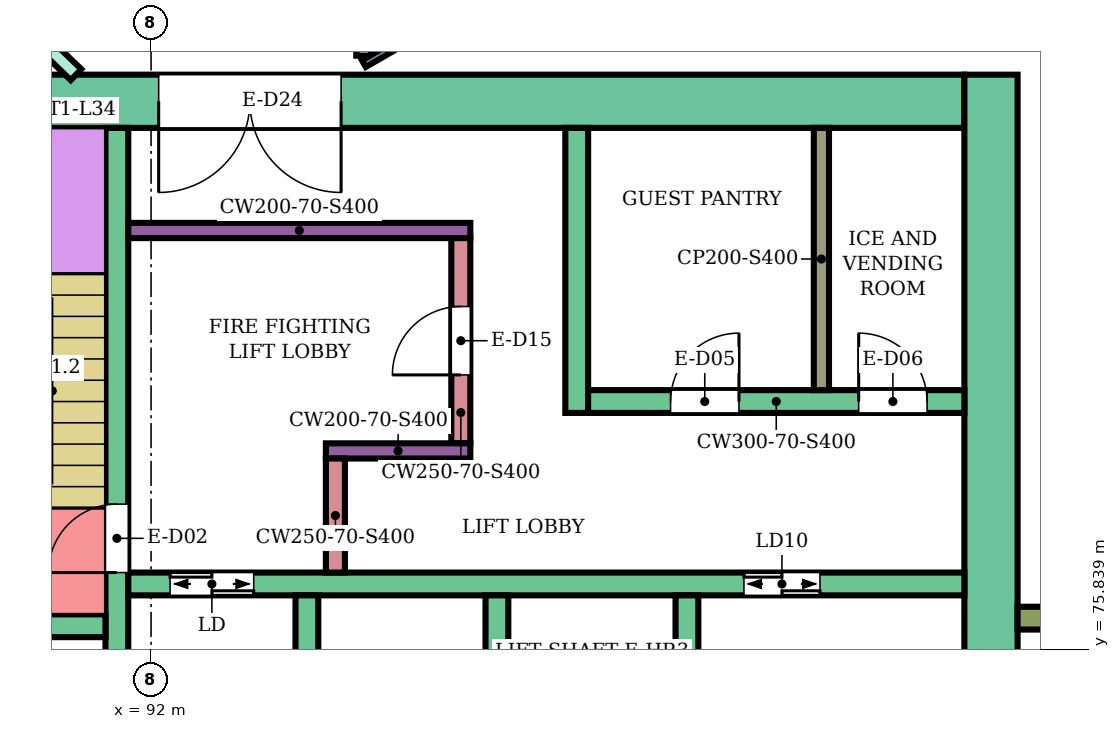
"""IFC4 building model, lengths in metres.
Left out: names, types, materials, properties, quantities, classifications, styles, units other than length and angle.
Written with IfcOpenShell. Run it as: python <this file> out.ifc"""

import sys

from ifc_helpers import new_model, si_unit, direction, frame, frame_2d, origin, place, context, subcontext, project, spatial, rectangle, extrude, element, fill, save


model = new_model("IFC4")
c1 = context("Model", 3, precision=1e-05, world=origin(), true_north=direction((0.0, 1.0)))
c2 = subcontext(c1, "Body", "Model", "MODEL_VIEW")
j1 = project(units=[si_unit("LENGTHUNIT", "METRE"), si_unit("PLANEANGLEUNIT", "RADIAN")], contexts=[c1])
p1 = place(None, origin())
s1 = spatial("IfcSite", under=j1, at=p1, CompositionType="ELEMENT")
p2 = place(p1, origin())
s2 = spatial("IfcBuilding", under=s1, at=p2, CompositionType="ELEMENT")
p3 = place(p2, frame((0.0, 0.0, 145.8)))
s3 = spatial("IfcBuildingStorey", under=s2, at=p3, CompositionType="ELEMENT", Elevation=145.8)
p4 = place(p3, frame((87.9, 83.05, 0.0), z_axis=(0.0, 0.0, 1.0), x_axis=(1.0, 0.0, 0.0)))
e1 = element("IfcWall", 1, at=p4, inside=s3, PredefinedType="SHEAR", context=c2, shape_type="SweptSolid", body=[
    extrude(rectangle(XDim=14.8, YDim=0.7, at=frame_2d((7.4, 0.0))), origin(), (0.0, 0.0, 1.0), 3.5),
])
p5 = place(p4, frame((4.2, 0.0, 0.0)))
e2 = element("IfcOpeningElement", 2, at=p5, cuts=e1, PredefinedType="OPENING", context=c2, shape_type="SweptSolid", body=[
    extrude(rectangle(XDim=2.4, YDim=2.4, at=frame_2d((1.2, 1.2))), frame((0.0, 0.36, 0.0), z_axis=(0.0, -1.0, 0.0), x_axis=(1.0, 0.0, 0.0)), (0.0, 0.0, 1.0), 0.72),
])
p6 = place(p3, frame((103.05, 66.6, 0.0), z_axis=(0.0, 0.0, 1.0), x_axis=(0.0, 1.0, 0.0)))
e3 = element("IfcWall", 3, at=p6, inside=s3, PredefinedType="SHEAR", context=c2, shape_type="SweptSolid", body=[
    extrude(rectangle(XDim=16.8, YDim=0.7, at=frame_2d((8.4, 0.0))), origin(), (0.0, 0.0, 1.0), 3.5),
])
p7 = place(p3, frame((91.55, 75.0, 0.0), z_axis=(0.0, 0.0, 1.0), x_axis=(0.0, 1.0, 0.0)))
e4 = element("IfcWall", 4, at=p7, inside=s3, PredefinedType="SHEAR", context=c2, shape_type="SweptSolid", body=[
    extrude(rectangle(XDim=7.7, YDim=0.3, at=frame_2d((3.85, 0.0))), origin(), (0.0, 0.0, 1.0), 3.5),
])
p8 = place(p7, frame((1.85, 0.0, 0.0)))
e5 = element("IfcOpeningElement", 5, at=p8, cuts=e4, PredefinedType="OPENING", context=c2, shape_type="SweptSolid", body=[
    extrude(rectangle(XDim=0.9, YDim=2.1, at=frame_2d((0.45, 1.05))), frame((0.0, 0.16, 0.0), z_axis=(0.0, -1.0, 0.0), x_axis=(1.0, 0.0, 0.0)), (0.0, 0.0, 1.0), 0.32),
])
p9 = place(p3, frame((88.35, 76.15, 0.0), z_axis=(0.0, 0.0, 1.0), x_axis=(1.0, 0.0, 0.0)))
e6 = element("IfcWall", 6, at=p9, inside=s3, PredefinedType="SHEAR", context=c2, shape_type="SweptSolid", body=[
    extrude(rectangle(XDim=3.05, YDim=0.3, at=frame_2d((1.525, 0.0))), origin(), (0.0, 0.0, 1.0), 3.5),
])
p10 = place(p9, frame((1.1, 0.0, 0.0)))
e7 = element("IfcOpeningElement", 7, at=p10, cuts=e6, PredefinedType="OPENING", context=c2, shape_type="SweptSolid", body=[
    extrude(rectangle(XDim=0.7, YDim=2.0, at=frame_2d((0.35, 1.0))), frame((0.0, 0.16, 0.0), z_axis=(0.0, -1.0, 0.0), x_axis=(1.0, 0.0, 0.0)), (0.0, 0.0, 1.0), 0.32),
])
p11 = place(p3, frame((91.7, 76.7, 0.0), z_axis=(0.0, 0.0, 1.0), x_axis=(1.0, 0.0, 0.0)))
e8 = element("IfcWall", 8, at=p11, inside=s3, PredefinedType="SHEAR", context=c2, shape_type="SweptSolid", body=[
    extrude(rectangle(XDim=11.0, YDim=0.3, at=frame_2d((5.5, 0.0))), origin(), (0.0, 0.0, 1.0), 3.5),
])
p12 = place(p11, frame((0.55, 0.0, 0.0)))
e9 = element("IfcOpeningElement", 9, at=p12, cuts=e8, PredefinedType="OPENING", context=c2, shape_type="SweptSolid", body=[
    extrude(rectangle(XDim=1.1, YDim=2.1, at=frame_2d((0.55, 1.05))), frame((0.0, 0.16, 0.0), z_axis=(0.0, -1.0, 0.0), x_axis=(1.0, 0.0, 0.0)), (0.0, 0.0, 1.0), 0.32),
])
p13 = place(p11, frame((8.1, 0.0, 0.0)))
e10 = element("IfcOpeningElement", 10, at=p13, cuts=e8, PredefinedType="OPENING", context=c2, shape_type="SweptSolid", body=[
    extrude(rectangle(XDim=1.0, YDim=2.1, at=frame_2d((0.5, 1.05))), frame((0.0, 0.16, 0.0), z_axis=(0.0, -1.0, 0.0), x_axis=(1.0, 0.0, 0.0)), (0.0, 0.0, 1.0), 0.32),
])
for number, where, z_axis, x_axis in (
    (11, (94.05, 74.0, 0.0), (0.0, 0.0, 1.0), (0.0, 1.0, 0.0)),
    (12, (96.55, 74.0, 0.0), (0.0, 0.0, 1.0), (0.0, 1.0, 0.0)),
    (13, (99.05, 74.0, 0.0), (0.0, 0.0, 1.0), (0.0, 1.0, 0.0)),
):
    element("IfcWall", number, at=place(p3, frame(where, z_axis=z_axis, x_axis=x_axis)), inside=s3, PredefinedType="SHEAR", context=c2, shape_type="SweptSolid", body=[
        extrude(rectangle(XDim=2.55, YDim=0.3, at=frame_2d((1.275, 0.0))), origin(), (0.0, 0.0, 1.0), 3.5),
    ])
p14 = place(p3, frame((91.7, 81.35, 0.0), z_axis=(0.0, 0.0, 1.0), x_axis=(1.0, 0.0, 0.0)))
e14 = element("IfcWall", 14, at=p14, inside=s3, PredefinedType="SHEAR", context=c2, shape_type="SweptSolid", body=[
    extrude(rectangle(XDim=4.5, YDim=0.2, at=frame_2d((2.25, 0.0))), origin(), (0.0, 0.0, 1.0), 3.5),
])
p15 = place(p3, frame((96.075, 78.55, 0.0), z_axis=(0.0, 0.0, 1.0), x_axis=(0.0, 1.0, 0.0)))
e15 = element("IfcWall", 15, at=p15, inside=s3, PredefinedType="SHEAR", context=c2, shape_type="SweptSolid", body=[
    extrude(rectangle(XDim=2.7, YDim=0.25, at=frame_2d((1.35, 0.0))), origin(), (0.0, 0.0, 1.0), 3.5),
])
p16 = place(p15, frame((0.9, 0.0, 0.0)))
e16 = element("IfcOpeningElement", 16, at=p16, cuts=e15, PredefinedType="OPENING", context=c2, shape_type="SweptSolid", body=[
    extrude(rectangle(XDim=0.9, YDim=2.1, at=frame_2d((0.45, 1.05))), frame((0.0, 0.135, 0.0), z_axis=(0.0, -1.0, 0.0), x_axis=(1.0, 0.0, 0.0)), (0.0, 0.0, 1.0), 0.27),
])
p17 = place(p3, frame((94.3, 78.45, 0.0), z_axis=(0.0, 0.0, 1.0), x_axis=(1.0, 0.0, 0.0)))
e17 = element("IfcWall", 17, at=p17, inside=s3, PredefinedType="SHEAR", context=c2, shape_type="SweptSolid", body=[
    extrude(rectangle(XDim=1.9, YDim=0.2, at=frame_2d((0.95, 0.0))), origin(), (0.0, 0.0, 1.0), 3.5),
])
p18 = place(p3, frame((94.425, 76.85, 0.0), z_axis=(0.0, 0.0, 1.0), x_axis=(0.0, 1.0, 0.0)))
e18 = element("IfcWall", 18, at=p18, inside=s3, PredefinedType="SHEAR", context=c2, shape_type="SweptSolid", body=[
    extrude(rectangle(XDim=1.5, YDim=0.25, at=frame_2d((0.75, 0.0))), origin(), (0.0, 0.0, 1.0), 3.5),
])
p19 = place(p3, frame((97.6, 78.95, 0.0), z_axis=(0.0, 0.0, 1.0), x_axis=(0.0, 1.0, 0.0)))
e19 = element("IfcWall", 19, at=p19, inside=s3, PredefinedType="SHEAR", context=c2, shape_type="SweptSolid", body=[
    extrude(rectangle(XDim=3.75, YDim=0.3, at=frame_2d((1.875, 0.0))), origin(), (0.0, 0.0, 1.0), 3.5),
])
p20 = place(p3, frame((97.75, 79.1, 0.0), z_axis=(0.0, 0.0, 1.0), x_axis=(1.0, 0.0, 0.0)))
e20 = element("IfcWall", 20, at=p20, inside=s3, PredefinedType="SHEAR", context=c2, shape_type="SweptSolid", body=[
    extrude(rectangle(XDim=4.95, YDim=0.3, at=frame_2d((2.475, 0.0))), origin(), (0.0, 0.0, 1.0), 3.5),
])
p21 = place(p20, frame((1.084, 0.0, 0.0)))
e21 = element("IfcOpeningElement", 21, at=p21, cuts=e20, PredefinedType="OPENING", context=c2, shape_type="SweptSolid", body=[
    extrude(rectangle(XDim=0.9, YDim=2.1, at=frame_2d((0.45, 1.05))), frame((0.0, 0.16, 0.0), z_axis=(0.0, -1.0, 0.0), x_axis=(1.0, 0.0, 0.0)), (0.0, 0.0, 1.0), 0.32),
])
p22 = place(p20, frame((3.56, 0.0, 0.0)))
e22 = element("IfcOpeningElement", 22, at=p22, cuts=e20, PredefinedType="OPENING", context=c2, shape_type="SweptSolid", body=[
    extrude(rectangle(XDim=0.9, YDim=2.1, at=frame_2d((0.45, 1.05))), frame((0.0, 0.16, 0.0), z_axis=(0.0, -1.0, 0.0), x_axis=(1.0, 0.0, 0.0)), (0.0, 0.0, 1.0), 0.32),
])
p23 = place(p3, frame((103.4, 76.25, 0.0), z_axis=(0.0, 0.0, 1.0), x_axis=(1.0, 0.0, 0.0)))
e23 = element("IfcWall", 23, at=p23, inside=s3, PredefinedType="NOTDEFINED", context=c2, shape_type="SweptSolid", body=[
    extrude(rectangle(XDim=2.416, YDim=0.3, at=frame_2d((1.208, 0.0))), origin(), (0.0, 0.0, 1.0), 3.9),
])
p24 = place(p3, frame((87.064, 87.211, 0.0), z_axis=(0.0, 0.0, 1.0), x_axis=(0.719562412484, -0.694427774891, 0.0)))
e24 = element("IfcWall", 24, at=p24, inside=s3, PredefinedType="PARTITIONING", context=c2, shape_type="SweptSolid", body=[
    extrude(rectangle(XDim=5.488, YDim=0.2, at=frame_2d((2.744, 0.0))), origin(), (0.0, 0.0, 1.0), 3.45),
])
p25 = place(p24, frame((2.294, 0.0, 0.0)))
e25 = element("IfcOpeningElement", 25, at=p25, cuts=e24, PredefinedType="OPENING", context=c2, shape_type="SweptSolid", body=[
    extrude(rectangle(XDim=0.9, YDim=2.1, at=frame_2d((0.45, 1.05))), frame((0.0, 0.11, 0.0), z_axis=(0.0, -1.0, 0.0), x_axis=(1.0, 0.0, 0.0)), (0.0, 0.0, 1.0), 0.22),
])
p26 = place(p3, frame((94.8, 83.65, 0.0), z_axis=(0.0, 0.0, 1.0), x_axis=(0.0, 1.0, 0.0)))
e26 = element("IfcWall", 26, at=p26, inside=s3, PredefinedType="PARTITIONING", context=c2, shape_type="SweptSolid", body=[
    extrude(rectangle(XDim=1.25, YDim=0.2, at=frame_2d((0.625, 0.0))), origin(), (0.0, 0.0, 1.0), 3.45),
])
p27 = place(p3, frame((94.8, 83.545, 0.0), z_axis=(0.0, 0.0, 1.0), x_axis=(0.86602264145, 0.500004784474, 0.0)))
e27 = element("IfcWall", 27, at=p27, inside=s3, PredefinedType="PARTITIONING", context=c2, shape_type="SweptSolid", body=[
    extrude(rectangle(XDim=8.708, YDim=0.1, at=frame_2d((4.354, 0.0))), origin(), (0.0, 0.0, 1.0), 3.45),
])
p28 = place(p27, frame((3.879, 0.0, 0.0)))
e28 = element("IfcOpeningElement", 28, at=p28, cuts=e27, PredefinedType="OPENING", context=c2, shape_type="SweptSolid", body=[
    extrude(rectangle(XDim=0.9, YDim=2.1, at=frame_2d((0.45, 1.05))), frame((0.0, 0.06, 0.0), z_axis=(0.0, -1.0, 0.0), x_axis=(1.0, 0.0, 0.0)), (0.0, 0.0, 1.0), 0.12),
])
p29 = place(p3, frame((100.819, 79.25, 0.0), z_axis=(0.0, 0.0, 1.0), x_axis=(0.0, 1.0, 0.0)))
e29 = element("IfcWall", 29, at=p29, inside=s3, PredefinedType="PARTITIONING", context=c2, shape_type="SweptSolid", body=[
    extrude(rectangle(XDim=3.45, YDim=0.2, at=frame_2d((1.725, 0.0))), origin(), (0.0, 0.0, 1.0), 3.5),
])
p30 = place(p8, origin())
e30 = element("IfcDoor", 30, at=p30, inside=s3, OperationType="SINGLE_SWING_LEFT", PredefinedType="DOOR", context=c2, shape_type="SweptSolid", body=[
    extrude(rectangle(XDim=0.9, YDim=2.1, at=frame_2d((0.45, 1.05))), frame((0.0, 0.025, 0.0), z_axis=(0.0, -1.0, 0.0), x_axis=(1.0, 0.0, 0.0)), (0.0, 0.0, 1.0), 0.05),
])
fill(e5, e30)
p31 = place(p12, origin())
e31 = element("IfcDoor", 31, at=p31, inside=s3, OperationType="DOUBLE_DOOR_SLIDING", PredefinedType="DOOR", context=c2, shape_type="SweptSolid", body=[
    extrude(rectangle(XDim=1.1, YDim=2.1, at=frame_2d((0.55, 1.05))), frame((0.0, 0.025, 0.0), z_axis=(0.0, -1.0, 0.0), x_axis=(1.0, 0.0, 0.0)), (0.0, 0.0, 1.0), 0.05),
])
fill(e9, e31)
p32 = place(p13, origin())
e32 = element("IfcDoor", 32, at=p32, inside=s3, OperationType="DOUBLE_DOOR_SLIDING", PredefinedType="DOOR", context=c2, shape_type="SweptSolid", body=[
    extrude(rectangle(XDim=1.0, YDim=2.1, at=frame_2d((0.5, 1.05))), frame((0.0, 0.025, 0.0), z_axis=(0.0, -1.0, 0.0), x_axis=(1.0, 0.0, 0.0)), (0.0, 0.0, 1.0), 0.05),
])
fill(e10, e32)
p33 = place(p16, origin())
e33 = element("IfcDoor", 33, at=p33, inside=s3, OperationType="SINGLE_SWING_LEFT", PredefinedType="DOOR", context=c2, shape_type="SweptSolid", body=[
    extrude(rectangle(XDim=0.9, YDim=2.1, at=frame_2d((0.45, 1.05))), frame((0.0, 0.025, 0.0), z_axis=(0.0, -1.0, 0.0), x_axis=(1.0, 0.0, 0.0)), (0.0, 0.0, 1.0), 0.05),
])
fill(e16, e33)
p34 = place(p21, origin())
e34 = element("IfcDoor", 34, at=p34, inside=s3, OperationType="SINGLE_SWING_RIGHT", PredefinedType="DOOR", context=c2, shape_type="SweptSolid", body=[
    extrude(rectangle(XDim=0.9, YDim=2.1, at=frame_2d((0.45, 1.05))), frame((0.0, 0.025, 0.0), z_axis=(0.0, -1.0, 0.0), x_axis=(1.0, 0.0, 0.0)), (0.0, 0.0, 1.0), 0.05),
])
fill(e21, e34)
p35 = place(p22, origin())
e35 = element("IfcDoor", 35, at=p35, inside=s3, OperationType="SINGLE_SWING_LEFT", PredefinedType="DOOR", context=c2, shape_type="SweptSolid", body=[
    extrude(rectangle(XDim=0.9, YDim=2.1, at=frame_2d((0.45, 1.05))), frame((0.0, 0.025, 0.0), z_axis=(0.0, -1.0, 0.0), x_axis=(1.0, 0.0, 0.0)), (0.0, 0.0, 1.0), 0.05),
])
fill(e22, e35)
p36 = place(p5, frame((2.4, 0.0, 0.0), z_axis=(0.0, 0.0, 1.0), x_axis=(-1.0, 0.0, 0.0)))
e36 = element("IfcDoor", 36, at=p36, inside=s3, OperationType="DOUBLE_DOOR_SINGLE_SWING", PredefinedType="DOOR", context=c2, shape_type="SweptSolid", body=[
    extrude(rectangle(XDim=2.4, YDim=2.4, at=frame_2d((1.2, 1.2))), frame((0.0, 0.025, 0.0), z_axis=(0.0, -1.0, 0.0), x_axis=(1.0, 0.0, 0.0)), (0.0, 0.0, 1.0), 0.05),
])
fill(e2, e36)
save(model, sys.argv[1])
